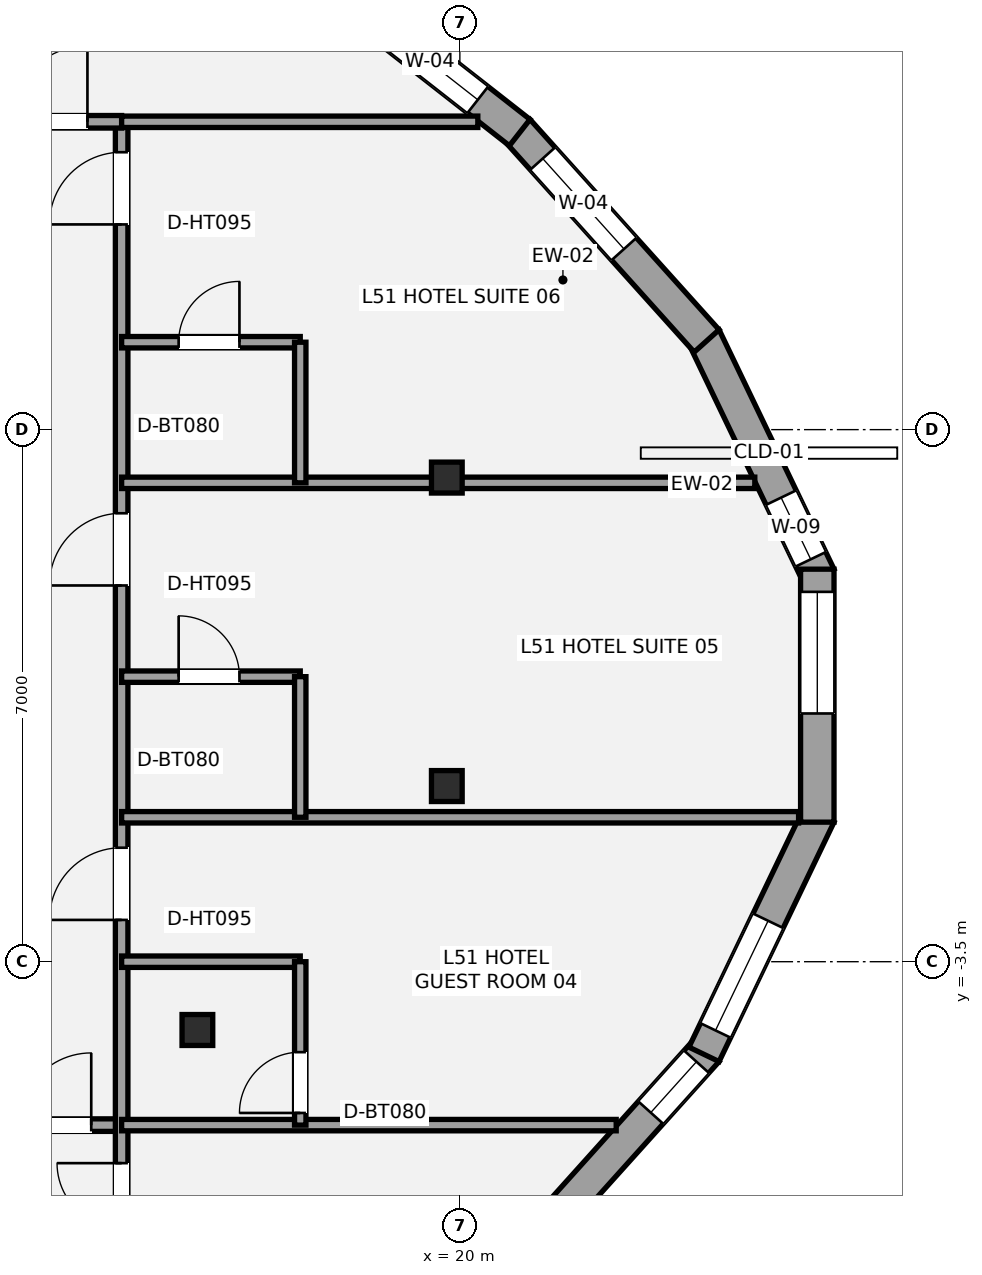
"""IFC4 building model, lengths in metres.
Left out: names, types, materials, properties, quantities, classifications, styles, units other than length and angle.
Written with IfcOpenShell. Run it as: python <this file> out.ifc"""

import sys

from ifc_helpers import new_model, si_unit, direction, frame, frame_2d, origin, origin_2d, place, context, subcontext, project, spatial, rectangle, i_section, extrude, element, fill, save


model = new_model("IFC4")
c1 = context("Model", 3, precision=1e-05, world=origin(), true_north=direction((0.0, 1.0)))
c2 = subcontext(c1, "Body", "Model", "MODEL_VIEW")
j1 = project(units=[si_unit("LENGTHUNIT", "METRE"), si_unit("PLANEANGLEUNIT", "RADIAN")], contexts=[c1])
p1 = place(None, origin())
s1 = spatial("IfcSite", under=j1, at=p1, CompositionType="ELEMENT")
p2 = place(p1, origin())
s2 = spatial("IfcBuilding", under=s1, at=p2, CompositionType="ELEMENT")
p3 = place(p2, frame((0.0, 0.0, 185.4)))
s3 = spatial("IfcBuildingStorey", under=s2, at=p3, CompositionType="ELEMENT", Elevation=185.4)
for number, where, z_axis, x_axis in (
    (1, (19.828, 2.869, 0.0), (0.0, 0.0, 1.0), (1.0, 0.0, 0.0)),
    (2, (16.547, -4.398, 0.0), (0.0, 0.0, 1.0), (1.0, 0.0, 0.0)),
    (3, (19.828, -1.189, 0.0), (0.0, 0.0, 1.0), (1.0, 0.0, 0.0)),
):
    element("IfcColumn", number, at=place(p3, frame(where, z_axis=z_axis, x_axis=x_axis)), inside=s3, PredefinedType="COLUMN", context=c2, shape_type="SweptSolid", body=[
        extrude(i_section(OverallWidth=0.404, OverallDepth=0.407, WebThickness=0.027, FlangeThickness=0.044, at=origin_2d()), origin(), (0.0, 0.0, 1.0), 3.2),
    ])
p4 = place(p3, frame((23.212, 4.719, 0.0), z_axis=(0.0, 0.0, 1.0), x_axis=(0.43276286683, -0.90150779314, 0.0)))
e4 = element("IfcWall", 4, at=p4, inside=s3, PredefinedType="STANDARD", context=c2, shape_type="SweptSolid", body=[
    extrude(rectangle(XDim=3.494, YDim=0.44, at=frame_2d((1.747, 0.0))), origin(), (0.0, 0.0, 1.0), 2.315),
])
p5 = place(p4, frame((2.344, 0.0, 0.58)))
e5 = element("IfcOpeningElement", 5, at=p5, cuts=e4, PredefinedType="OPENING", context=c2, shape_type="SweptSolid", body=[
    extrude(rectangle(XDim=0.9, YDim=1.35, at=frame_2d((0.45, 0.675))), frame((0.0, 0.23, 0.0), z_axis=(0.0, -1.0, 0.0), x_axis=(1.0, 0.0, 0.0)), (0.0, 0.0, 1.0), 0.46),
])
p6 = place(p3, frame((20.759, 7.435, 0.0), z_axis=(0.0, 0.0, 1.0), x_axis=(0.668547778607, -0.743669192396, 0.0)))
e6 = element("IfcWall", 6, at=p6, inside=s3, PredefinedType="STANDARD", context=c2, shape_type="SweptSolid", body=[
    extrude(rectangle(XDim=3.721, YDim=0.44, at=frame_2d((1.861, 0.0))), origin(), (0.0, 0.0, 1.0), 2.315),
])
p7 = place(p6, frame((0.495, 0.0, 0.58)))
e7 = element("IfcOpeningElement", 7, at=p7, cuts=e6, PredefinedType="OPENING", context=c2, shape_type="SweptSolid", body=[
    extrude(rectangle(XDim=1.6, YDim=1.55, at=frame_2d((0.8, 0.775))), frame((0.0, 0.23, 0.0), z_axis=(0.0, -1.0, 0.0), x_axis=(1.0, 0.0, 0.0)), (0.0, 0.0, 1.0), 0.46),
])
p8 = place(p3, frame((17.756, 9.781, 0.0), z_axis=(0.0, 0.0, 1.0), x_axis=(0.787518383176, -0.616291161838, 0.0)))
e8 = element("IfcWall", 8, at=p8, inside=s3, PredefinedType="STANDARD", context=c2, shape_type="SweptSolid", body=[
    extrude(rectangle(XDim=3.85, YDim=0.44, at=frame_2d((1.925, 0.0))), origin(), (0.0, 0.0, 1.0), 2.315),
])
p9 = place(p8, frame((1.55, 0.0, 0.58)))
e9 = element("IfcOpeningElement", 9, at=p9, cuts=e8, PredefinedType="OPENING", context=c2, shape_type="SweptSolid", body=[
    extrude(rectangle(XDim=1.6, YDim=1.55, at=frame_2d((0.8, 0.775))), frame((0.0, 0.23, 0.0), z_axis=(0.0, -1.0, 0.0), x_axis=(1.0, 0.0, 0.0)), (0.0, 0.0, 1.0), 0.46),
])
p10 = place(p3, frame((23.247, -4.667, 0.0), z_axis=(0.0, 0.0, 1.0), x_axis=(-0.668547778607, -0.743669192396, 0.0)))
e10 = element("IfcWall", 10, at=p10, inside=s3, PredefinedType="STANDARD", context=c2, shape_type="SweptSolid", body=[
    extrude(rectangle(XDim=3.721, YDim=0.44, at=frame_2d((1.861, 0.0))), origin(), (0.0, 0.0, 1.0), 2.315),
])
p11 = place(p10, frame((0.2, 0.0, 0.58)))
e11 = element("IfcOpeningElement", 11, at=p11, cuts=e10, PredefinedType="OPENING", context=c2, shape_type="SweptSolid", body=[
    extrude(rectangle(XDim=0.9, YDim=1.35, at=frame_2d((0.45, 0.675))), frame((0.0, 0.23, 0.0), z_axis=(0.0, -1.0, 0.0), x_axis=(1.0, 0.0, 0.0)), (0.0, 0.0, 1.0), 0.46),
])
p12 = place(p3, frame((24.725, -1.569, 0.0), z_axis=(0.0, 0.0, 1.0), x_axis=(-0.43276286683, -0.90150779314, 0.0)))
e12 = element("IfcWall", 12, at=p12, inside=s3, PredefinedType="STANDARD", context=c2, shape_type="SweptSolid", body=[
    extrude(rectangle(XDim=3.494, YDim=0.44, at=frame_2d((1.747, 0.0))), origin(), (0.0, 0.0, 1.0), 2.315),
])
p13 = place(p12, frame((1.545, 0.0, 0.58)))
e13 = element("IfcOpeningElement", 13, at=p13, cuts=e12, PredefinedType="OPENING", context=c2, shape_type="SweptSolid", body=[
    extrude(rectangle(XDim=1.6, YDim=1.55, at=frame_2d((0.8, 0.775))), frame((0.0, 0.23, 0.0), z_axis=(0.0, -1.0, 0.0), x_axis=(1.0, 0.0, 0.0)), (0.0, 0.0, 1.0), 0.46),
])
p14 = place(p3, frame((24.703, 1.664, 0.0), z_axis=(0.0, 0.0, 1.0), x_axis=(0.0, -1.0, 0.0)))
e14 = element("IfcWall", 14, at=p14, inside=s3, PredefinedType="STANDARD", context=c2, shape_type="SweptSolid", body=[
    extrude(rectangle(XDim=3.328, YDim=0.44, at=frame_2d((1.664, 0.0))), origin(), (0.0, 0.0, 1.0), 2.315),
])
p15 = place(p14, frame((0.298, 0.0, 0.58)))
e15 = element("IfcOpeningElement", 15, at=p15, cuts=e14, PredefinedType="OPENING", context=c2, shape_type="SweptSolid", body=[
    extrude(rectangle(XDim=1.6, YDim=1.55, at=frame_2d((0.8, 0.775))), frame((0.0, 0.23, 0.0), z_axis=(0.0, -1.0, 0.0), x_axis=(1.0, 0.0, 0.0)), (0.0, 0.0, 1.0), 0.46),
])
p16 = place(p3, frame((-16.1, -5.65, 0.0), z_axis=(0.0, 0.0, 1.0), x_axis=(1.0, 0.0, 0.0)))
e16 = element("IfcWall", 16, at=p16, inside=s3, PredefinedType="PARTITIONING", context=c2, shape_type="SweptSolid", body=[
    extrude(rectangle(XDim=31.65, YDim=0.165, at=frame_2d((15.825, 0.0))), origin(), (0.0, 0.0, 1.0), 2.398),
])
p17 = place(p16, frame((8.95, 0.0, 0.0)))
e17 = element("IfcOpeningElement", 17, at=p17, cuts=e16, PredefinedType="OPENING", context=c2, shape_type="SweptSolid", body=[
    extrude(rectangle(XDim=0.95, YDim=2.15, at=frame_2d((0.475, 1.075))), frame((0.0, 0.093, 0.0), z_axis=(0.0, -1.0, 0.0), x_axis=(1.0, 0.0, 0.0)), (0.0, 0.0, 1.0), 0.185),
])
p18 = place(p16, frame((18.95, 0.0, 0.0)))
e18 = element("IfcOpeningElement", 18, at=p18, cuts=e16, PredefinedType="OPENING", context=c2, shape_type="SweptSolid", body=[
    extrude(rectangle(XDim=0.95, YDim=2.15, at=frame_2d((0.475, 1.075))), frame((0.0, 0.093, 0.0), z_axis=(0.0, -1.0, 0.0), x_axis=(1.0, 0.0, 0.0)), (0.0, 0.0, 1.0), 0.185),
])
p19 = place(p16, frame((30.3, 0.0, 0.0)))
e19 = element("IfcOpeningElement", 19, at=p19, cuts=e16, PredefinedType="OPENING", context=c2, shape_type="SweptSolid", body=[
    extrude(rectangle(XDim=0.95, YDim=2.15, at=frame_2d((0.475, 1.075))), frame((0.0, 0.093, 0.0), z_axis=(0.0, -1.0, 0.0), x_axis=(1.0, 0.0, 0.0)), (0.0, 0.0, 1.0), 0.185),
])
p20 = place(p3, frame((15.55, -11.0, 0.0), z_axis=(0.0, 0.0, 1.0), x_axis=(0.0, 1.0, 0.0)))
e20 = element("IfcWall", 20, at=p20, inside=s3, PredefinedType="PARTITIONING", context=c2, shape_type="SweptSolid", body=[
    extrude(rectangle(XDim=18.55, YDim=0.165, at=frame_2d((9.275, 0.0))), origin(), (0.0, 0.0, 1.0), 2.473),
])
p21 = place(p20, frame((4.0, 0.0, 0.0)))
e21 = element("IfcOpeningElement", 21, at=p21, cuts=e20, PredefinedType="OPENING", context=c2, shape_type="SweptSolid", body=[
    extrude(rectangle(XDim=0.85, YDim=2.1, at=frame_2d((0.425, 1.05))), frame((0.0, 0.093, 0.0), z_axis=(0.0, -1.0, 0.0), x_axis=(1.0, 0.0, 0.0)), (0.0, 0.0, 1.0), 0.185),
])
p22 = place(p20, frame((8.05, 0.0, 0.0)))
e22 = element("IfcOpeningElement", 22, at=p22, cuts=e20, PredefinedType="OPENING", context=c2, shape_type="SweptSolid", body=[
    extrude(rectangle(XDim=0.95, YDim=2.15, at=frame_2d((0.475, 1.075))), frame((0.0, 0.093, 0.0), z_axis=(0.0, -1.0, 0.0), x_axis=(1.0, 0.0, 0.0)), (0.0, 0.0, 1.0), 0.185),
])
p23 = place(p20, frame((12.45, 0.0, 0.0)))
e23 = element("IfcOpeningElement", 23, at=p23, cuts=e20, PredefinedType="OPENING", context=c2, shape_type="SweptSolid", body=[
    extrude(rectangle(XDim=0.95, YDim=2.15, at=frame_2d((0.475, 1.075))), frame((0.0, 0.093, 0.0), z_axis=(0.0, -1.0, 0.0), x_axis=(1.0, 0.0, 0.0)), (0.0, 0.0, 1.0), 0.185),
])
p24 = place(p20, frame((17.2, 0.0, 0.0)))
e24 = element("IfcOpeningElement", 24, at=p24, cuts=e20, PredefinedType="OPENING", context=c2, shape_type="SweptSolid", body=[
    extrude(rectangle(XDim=0.95, YDim=2.15, at=frame_2d((0.475, 1.075))), frame((0.0, 0.093, 0.0), z_axis=(0.0, -1.0, 0.0), x_axis=(1.0, 0.0, 0.0)), (0.0, 0.0, 1.0), 0.185),
])
p25 = place(p3, frame((13.8, 7.55, 0.0), z_axis=(0.0, 0.0, 1.0), x_axis=(1.0, 0.0, 0.0)))
e25 = element("IfcWall", 25, at=p25, inside=s3, PredefinedType="PARTITIONING", context=c2, shape_type="SweptSolid", body=[
    extrude(rectangle(XDim=1.75, YDim=0.165, at=frame_2d((0.875, 0.0))), origin(), (0.0, 0.0, 1.0), 3.02),
])
p26 = place(p25, frame((0.3, 0.0, 0.0)))
e26 = element("IfcOpeningElement", 26, at=p26, cuts=e25, PredefinedType="OPENING", context=c2, shape_type="SweptSolid", body=[
    extrude(rectangle(XDim=1.0, YDim=2.15, at=frame_2d((0.5, 1.075))), frame((0.0, 0.093, 0.0), z_axis=(0.0, -1.0, 0.0), x_axis=(1.0, 0.0, 0.0)), (0.0, 0.0, 1.0), 0.185),
])
p27 = place(p3, frame((15.55, 7.55, 0.0), z_axis=(0.0, 0.0, 1.0), x_axis=(1.0, 0.0, 0.0)))
e27 = element("IfcWall", 27, at=p27, inside=s3, PredefinedType="PLUMBINGWALL", context=c2, shape_type="SweptSolid", body=[
    extrude(rectangle(XDim=4.686, YDim=0.15, at=frame_2d((2.343, 0.0))), origin(), (0.0, 0.0, 1.0), 2.473),
])
p28 = place(p3, frame((15.55, -5.65, 0.0), z_axis=(0.0, 0.0, 1.0), x_axis=(1.0, 0.0, 0.0)))
e28 = element("IfcWall", 28, at=p28, inside=s3, PredefinedType="PLUMBINGWALL", context=c2, shape_type="SweptSolid", body=[
    extrude(rectangle(XDim=6.507, YDim=0.15, at=frame_2d((3.253, 0.0))), origin(), (0.0, 0.0, 1.0), 2.473),
])
p29 = place(p3, frame((15.55, -1.6, 0.0), z_axis=(0.0, 0.0, 1.0), x_axis=(1.0, 0.0, 0.0)))
e29 = element("IfcWall", 29, at=p29, inside=s3, PredefinedType="PLUMBINGWALL", context=c2, shape_type="SweptSolid", body=[
    extrude(rectangle(XDim=8.907, YDim=0.15, at=frame_2d((4.453, 0.0))), origin(), (0.0, 0.0, 1.0), 2.398),
])
p30 = place(p3, frame((15.55, 2.8, 0.0), z_axis=(0.0, 0.0, 1.0), x_axis=(1.0, 0.0, 0.0)))
e30 = element("IfcWall", 30, at=p30, inside=s3, PredefinedType="PLUMBINGWALL", context=c2, shape_type="SweptSolid", body=[
    extrude(rectangle(XDim=8.331, YDim=0.15, at=frame_2d((4.165, 0.0))), origin(), (0.0, 0.0, 1.0), 2.473),
])
p31 = place(p3, frame((15.55, -3.5, 0.0), z_axis=(0.0, 0.0, 1.0), x_axis=(1.0, 0.0, 0.0)))
e31 = element("IfcWall", 31, at=p31, inside=s3, PredefinedType="PLUMBINGWALL", context=c2, shape_type="SweptSolid", body=[
    extrude(rectangle(XDim=2.35, YDim=0.15, at=frame_2d((1.175, 0.0))), origin(), (0.0, 0.0, 1.0), 2.398),
])
p32 = place(p3, frame((17.9, -5.65, 0.0), z_axis=(0.0, 0.0, 1.0), x_axis=(0.0, 1.0, 0.0)))
e32 = element("IfcWall", 32, at=p32, inside=s3, PredefinedType="PLUMBINGWALL", context=c2, shape_type="SweptSolid", body=[
    extrude(rectangle(XDim=2.15, YDim=0.15, at=frame_2d((1.075, 0.0))), origin(), (0.0, 0.0, 1.0), 2.473),
])
p33 = place(p32, frame((0.16, 0.0, 0.0)))
e33 = element("IfcOpeningElement", 33, at=p33, cuts=e32, PredefinedType="OPENING", context=c2, shape_type="SweptSolid", body=[
    extrude(rectangle(XDim=0.8, YDim=2.1, at=frame_2d((0.4, 1.05))), frame((0.0, 0.085, 0.0), z_axis=(0.0, -1.0, 0.0), x_axis=(1.0, 0.0, 0.0)), (0.0, 0.0, 1.0), 0.17),
])
p34 = place(p3, frame((15.55, 0.25, 0.0), z_axis=(0.0, 0.0, 1.0), x_axis=(1.0, 0.0, 0.0)))
e34 = element("IfcWall", 34, at=p34, inside=s3, PredefinedType="PLUMBINGWALL", context=c2, shape_type="SweptSolid", body=[
    extrude(rectangle(XDim=2.35, YDim=0.15, at=frame_2d((1.175, 0.0))), origin(), (0.0, 0.0, 1.0), 2.473),
])
p35 = place(p34, frame((0.75, 0.0, 0.0)))
e35 = element("IfcOpeningElement", 35, at=p35, cuts=e34, PredefinedType="OPENING", context=c2, shape_type="SweptSolid", body=[
    extrude(rectangle(XDim=0.8, YDim=2.1, at=frame_2d((0.4, 1.05))), frame((0.0, 0.085, 0.0), z_axis=(0.0, -1.0, 0.0), x_axis=(1.0, 0.0, 0.0)), (0.0, 0.0, 1.0), 0.17),
])
p36 = place(p3, frame((17.9, -1.6, 0.0), z_axis=(0.0, 0.0, 1.0), x_axis=(0.0, 1.0, 0.0)))
e36 = element("IfcWall", 36, at=p36, inside=s3, PredefinedType="PLUMBINGWALL", context=c2, shape_type="SweptSolid", body=[
    extrude(rectangle(XDim=1.85, YDim=0.15, at=frame_2d((0.925, 0.0))), origin(), (0.0, 0.0, 1.0), 3.02),
])
p37 = place(p3, frame((15.55, 4.65, 0.0), z_axis=(0.0, 0.0, 1.0), x_axis=(1.0, 0.0, 0.0)))
e37 = element("IfcWall", 37, at=p37, inside=s3, PredefinedType="PLUMBINGWALL", context=c2, shape_type="SweptSolid", body=[
    extrude(rectangle(XDim=2.35, YDim=0.15, at=frame_2d((1.175, 0.0))), origin(), (0.0, 0.0, 1.0), 3.02),
])
p38 = place(p37, frame((0.75, 0.0, 0.0)))
e38 = element("IfcOpeningElement", 38, at=p38, cuts=e37, PredefinedType="OPENING", context=c2, shape_type="SweptSolid", body=[
    extrude(rectangle(XDim=0.8, YDim=2.1, at=frame_2d((0.4, 1.05))), frame((0.0, 0.085, 0.0), z_axis=(0.0, -1.0, 0.0), x_axis=(1.0, 0.0, 0.0)), (0.0, 0.0, 1.0), 0.17),
])
p39 = place(p3, frame((17.9, 2.8, 0.0), z_axis=(0.0, 0.0, 1.0), x_axis=(0.0, 1.0, 0.0)))
e39 = element("IfcWall", 39, at=p39, inside=s3, PredefinedType="PLUMBINGWALL", context=c2, shape_type="SweptSolid", body=[
    extrude(rectangle(XDim=1.85, YDim=0.15, at=frame_2d((0.925, 0.0))), origin(), (0.0, 0.0, 1.0), 3.02),
])
p40 = place(p5, origin())
e40 = element("IfcWindow", 40, at=p40, inside=s3, PartitioningType="SINGLE_PANEL", PredefinedType="WINDOW", context=c2, shape_type="SweptSolid", body=[
    extrude(rectangle(XDim=0.9, YDim=1.35, at=frame_2d((0.45, 0.675))), frame((0.0, -0.01, 0.0), z_axis=(0.0, -1.0, 0.0), x_axis=(1.0, 0.0, 0.0)), (0.0, 0.0, 1.0), 0.06),
])
fill(e5, e40)
p41 = place(p7, origin())
e41 = element("IfcWindow", 41, at=p41, inside=s3, PartitioningType="SINGLE_PANEL", PredefinedType="WINDOW", context=c2, shape_type="SweptSolid", body=[
    extrude(rectangle(XDim=1.6, YDim=1.55, at=frame_2d((0.8, 0.775))), frame((0.0, -0.01, 0.0), z_axis=(0.0, -1.0, 0.0), x_axis=(1.0, 0.0, 0.0)), (0.0, 0.0, 1.0), 0.06),
])
fill(e7, e41)
p42 = place(p9, origin())
e42 = element("IfcWindow", 42, at=p42, inside=s3, PartitioningType="SINGLE_PANEL", PredefinedType="WINDOW", context=c2, shape_type="SweptSolid", body=[
    extrude(rectangle(XDim=1.6, YDim=1.55, at=frame_2d((0.8, 0.775))), frame((0.0, -0.01, 0.0), z_axis=(0.0, -1.0, 0.0), x_axis=(1.0, 0.0, 0.0)), (0.0, 0.0, 1.0), 0.06),
])
fill(e9, e42)
p43 = place(p11, origin())
e43 = element("IfcWindow", 43, at=p43, inside=s3, PartitioningType="SINGLE_PANEL", PredefinedType="WINDOW", context=c2, shape_type="SweptSolid", body=[
    extrude(rectangle(XDim=0.9, YDim=1.35, at=frame_2d((0.45, 0.675))), frame((0.0, -0.01, 0.0), z_axis=(0.0, -1.0, 0.0), x_axis=(1.0, 0.0, 0.0)), (0.0, 0.0, 1.0), 0.06),
])
fill(e11, e43)
p44 = place(p13, origin())
e44 = element("IfcWindow", 44, at=p44, inside=s3, PartitioningType="SINGLE_PANEL", PredefinedType="WINDOW", context=c2, shape_type="SweptSolid", body=[
    extrude(rectangle(XDim=1.6, YDim=1.55, at=frame_2d((0.8, 0.775))), frame((0.0, -0.01, 0.0), z_axis=(0.0, -1.0, 0.0), x_axis=(1.0, 0.0, 0.0)), (0.0, 0.0, 1.0), 0.06),
])
fill(e13, e44)
p45 = place(p15, origin())
e45 = element("IfcWindow", 45, at=p45, inside=s3, PartitioningType="SINGLE_PANEL", PredefinedType="WINDOW", context=c2, shape_type="SweptSolid", body=[
    extrude(rectangle(XDim=1.6, YDim=1.55, at=frame_2d((0.8, 0.775))), frame((0.0, -0.01, 0.0), z_axis=(0.0, -1.0, 0.0), x_axis=(1.0, 0.0, 0.0)), (0.0, 0.0, 1.0), 0.06),
])
fill(e15, e45)
p46 = place(p26, origin())
e46 = element("IfcDoor", 46, at=p46, inside=s3, OperationType="SINGLE_SWING_RIGHT", PredefinedType="DOOR", context=c2, shape_type="SweptSolid", body=[
    extrude(rectangle(XDim=1.0, YDim=2.15, at=frame_2d((0.5, 1.075))), frame((0.0, 0.025, 0.0), z_axis=(0.0, -1.0, 0.0), x_axis=(1.0, 0.0, 0.0)), (0.0, 0.0, 1.0), 0.05),
])
fill(e26, e46)
p47 = place(p21, origin())
e47 = element("IfcDoor", 47, at=p47, inside=s3, OperationType="SINGLE_SWING_RIGHT", PredefinedType="DOOR", context=c2, shape_type="SweptSolid", body=[
    extrude(rectangle(XDim=0.85, YDim=2.1, at=frame_2d((0.425, 1.05))), frame((0.0, 0.025, 0.0), z_axis=(0.0, -1.0, 0.0), x_axis=(1.0, 0.0, 0.0)), (0.0, 0.0, 1.0), 0.05),
])
fill(e21, e47)
p48 = place(p19, origin())
e48 = element("IfcDoor", 48, at=p48, inside=s3, OperationType="SINGLE_SWING_RIGHT", PredefinedType="DOOR", context=c2, shape_type="SweptSolid", body=[
    extrude(rectangle(XDim=0.95, YDim=2.15, at=frame_2d((0.475, 1.075))), frame((0.0, 0.025, 0.0), z_axis=(0.0, -1.0, 0.0), x_axis=(1.0, 0.0, 0.0)), (0.0, 0.0, 1.0), 0.05),
])
fill(e19, e48)
p49 = place(p22, origin())
e49 = element("IfcDoor", 49, at=p49, inside=s3, OperationType="SINGLE_SWING_LEFT", PredefinedType="DOOR", context=c2, shape_type="SweptSolid", body=[
    extrude(rectangle(XDim=0.95, YDim=2.15, at=frame_2d((0.475, 1.075))), frame((0.0, 0.025, 0.0), z_axis=(0.0, -1.0, 0.0), x_axis=(1.0, 0.0, 0.0)), (0.0, 0.0, 1.0), 0.05),
])
fill(e22, e49)
p50 = place(p33, origin())
e50 = element("IfcDoor", 50, at=p50, inside=s3, OperationType="SINGLE_SWING_LEFT", PredefinedType="DOOR", context=c2, shape_type="SweptSolid", body=[
    extrude(rectangle(XDim=0.8, YDim=2.1, at=frame_2d((0.4, 1.05))), frame((0.0, 0.025, 0.0), z_axis=(0.0, -1.0, 0.0), x_axis=(1.0, 0.0, 0.0)), (0.0, 0.0, 1.0), 0.05),
])
fill(e33, e50)
p51 = place(p23, origin())
e51 = element("IfcDoor", 51, at=p51, inside=s3, OperationType="SINGLE_SWING_LEFT", PredefinedType="DOOR", context=c2, shape_type="SweptSolid", body=[
    extrude(rectangle(XDim=0.95, YDim=2.15, at=frame_2d((0.475, 1.075))), frame((0.0, 0.025, 0.0), z_axis=(0.0, -1.0, 0.0), x_axis=(1.0, 0.0, 0.0)), (0.0, 0.0, 1.0), 0.05),
])
fill(e23, e51)
p52 = place(p35, origin())
e52 = element("IfcDoor", 52, at=p52, inside=s3, OperationType="SINGLE_SWING_LEFT", PredefinedType="DOOR", context=c2, shape_type="SweptSolid", body=[
    extrude(rectangle(XDim=0.8, YDim=2.1, at=frame_2d((0.4, 1.05))), frame((0.0, 0.025, 0.0), z_axis=(0.0, -1.0, 0.0), x_axis=(1.0, 0.0, 0.0)), (0.0, 0.0, 1.0), 0.05),
])
fill(e35, e52)
p53 = place(p24, origin())
e53 = element("IfcDoor", 53, at=p53, inside=s3, OperationType="SINGLE_SWING_LEFT", PredefinedType="DOOR", context=c2, shape_type="SweptSolid", body=[
    extrude(rectangle(XDim=0.95, YDim=2.15, at=frame_2d((0.475, 1.075))), frame((0.0, 0.025, 0.0), z_axis=(0.0, -1.0, 0.0), x_axis=(1.0, 0.0, 0.0)), (0.0, 0.0, 1.0), 0.05),
])
fill(e24, e53)
p54 = place(p38, origin())
e54 = element("IfcDoor", 54, at=p54, inside=s3, OperationType="SINGLE_SWING_RIGHT", PredefinedType="DOOR", context=c2, shape_type="SweptSolid", body=[
    extrude(rectangle(XDim=0.8, YDim=2.1, at=frame_2d((0.4, 1.05))), frame((0.0, 0.025, 0.0), z_axis=(0.0, -1.0, 0.0), x_axis=(1.0, 0.0, 0.0)), (0.0, 0.0, 1.0), 0.05),
])
fill(e38, e54)
save(model, sys.argv[1])
